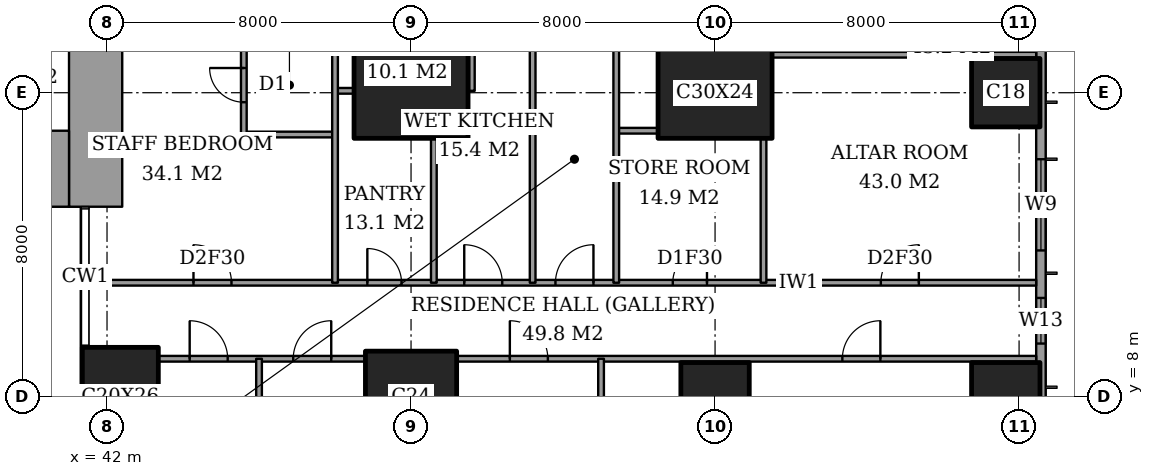
"""IFC4 building model, lengths in metres.
Left out: names, types, materials, properties, quantities, classifications, styles, units other than length and angle.
Written with IfcOpenShell. Run it as: python <this file> out.ifc"""

import sys

from ifc_helpers import new_model, si_unit, direction, frame, frame_2d, origin, origin_2d, place, context, subcontext, project, spatial, rectangle, extrude, element, fill, save


model = new_model("IFC4")
c1 = context("Model", 3, precision=1e-05, world=origin(), true_north=direction((0.0, 1.0)))
c2 = subcontext(c1, "Body", "Model", "MODEL_VIEW")
j1 = project(units=[si_unit("LENGTHUNIT", "METRE"), si_unit("PLANEANGLEUNIT", "RADIAN")], contexts=[c1])
p1 = place(None, origin())
s1 = spatial("IfcSite", under=j1, at=p1, CompositionType="ELEMENT")
p2 = place(p1, origin())
s2 = spatial("IfcBuilding", under=s1, at=p2, CompositionType="ELEMENT")
p3 = place(p2, frame((0.0, 0.0, 211.0)))
s3 = spatial("IfcBuildingStorey", under=s2, at=p3, CompositionType="ELEMENT", Elevation=211.0)
p4 = place(p3, frame((42.35, 8.0, 0.0), z_axis=(0.0, 0.0, 1.0), x_axis=(1.0, 0.0, 0.0)))
e1 = element("IfcColumn", 1, at=p4, inside=s3, PredefinedType="COLUMN", context=c2, shape_type="SweptSolid", body=[
    extrude(rectangle(XDim=2.0, YDim=2.6, at=origin_2d()), origin(), (0.0, 0.0, 1.0), 3.6),
])
p5 = place(p3, frame((50.0, 8.0, 0.0), z_axis=(0.0, 0.0, 1.0), x_axis=(1.0, 0.0, 0.0)))
e2 = element("IfcColumn", 2, at=p5, inside=s3, PredefinedType="COLUMN", context=c2, shape_type="SweptSolid", body=[
    extrude(rectangle(XDim=2.4, YDim=2.4, at=origin_2d()), origin(), (0.0, 0.0, 1.0), 3.6),
])
p6 = place(p3, frame((50.0, 16.0, 0.0), z_axis=(0.0, 0.0, 1.0), x_axis=(1.0, 0.0, 0.0)))
e3 = element("IfcColumn", 3, at=p6, inside=s3, PredefinedType="COLUMN", context=c2, shape_type="SweptSolid", body=[
    extrude(rectangle(XDim=3.0, YDim=2.4, at=origin_2d()), origin(), (0.0, 0.0, 1.0), 3.6),
])
p7 = place(p3, frame((58.0, 8.0, 0.0), z_axis=(0.0, 0.0, 1.0), x_axis=(1.0, 0.0, 0.0)))
e4 = element("IfcColumn", 4, at=p7, inside=s3, PredefinedType="COLUMN", context=c2, shape_type="SweptSolid", body=[
    extrude(rectangle(XDim=1.8, YDim=1.8, at=origin_2d()), origin(), (0.0, 0.0, 1.0), 3.6),
])
p8 = place(p3, frame((58.0, 16.0, 0.0), z_axis=(0.0, 0.0, 1.0), x_axis=(1.0, 0.0, 0.0)))
e5 = element("IfcColumn", 5, at=p8, inside=s3, PredefinedType="COLUMN", context=c2, shape_type="SweptSolid", body=[
    extrude(rectangle(XDim=3.0, YDim=2.4, at=origin_2d()), origin(), (0.0, 0.0, 1.0), 3.6),
])
for number, where, z_axis, x_axis in (
    (6, (65.65, 8.0, 0.0), (0.0, 0.0, 1.0), (1.0, 0.0, 0.0)),
    (7, (65.65, 16.0, 0.0), (0.0, 0.0, 1.0), (1.0, 0.0, 0.0)),
):
    element("IfcColumn", number, at=place(p3, frame(where, z_axis=z_axis, x_axis=x_axis)), inside=s3, PredefinedType="COLUMN", context=c2, shape_type="SweptSolid", body=[
        extrude(rectangle(XDim=1.8, YDim=1.8, at=origin_2d()), origin(), (0.0, 0.0, 1.0), 3.6),
    ])
p9 = place(p3, frame((37.85, 14.0, 0.0), z_axis=(0.0, 0.0, 1.0), x_axis=(1.0, 0.0, 0.0)))
e8 = element("IfcWall", 8, at=p9, inside=s3, PredefinedType="SHEAR", context=c2, shape_type="SweptSolid", body=[
    extrude(rectangle(XDim=3.15, YDim=2.0, at=frame_2d((1.575, 0.0))), origin(), (0.0, 0.0, 1.0), 3.6),
])
p10 = place(p3, frame((41.7, 13.0, 0.0), z_axis=(0.0, 0.0, 1.0), x_axis=(0.0, 1.0, 0.0)))
e9 = element("IfcWall", 9, at=p10, inside=s3, PredefinedType="SHEAR", context=c2, shape_type="SweptSolid", body=[
    extrude(rectangle(XDim=11.85, YDim=1.4, at=frame_2d((5.925, 0.0))), origin(), (0.0, 0.0, 1.0), 3.6),
])
p11 = place(p10, frame((7.5, 0.0, 0.0)))
e10 = element("IfcOpeningElement", 10, at=p11, cuts=e9, PredefinedType="OPENING", context=c2, shape_type="SweptSolid", body=[
    extrude(rectangle(XDim=1.8, YDim=2.4, at=frame_2d((0.9, 1.2))), frame((0.0, 0.71, 0.0), z_axis=(0.0, -1.0, 0.0), x_axis=(1.0, 0.0, 0.0)), (0.0, 0.0, 1.0), 1.42),
])
p12 = place(p3, frame((66.575, 3.175, 0.0), z_axis=(0.0, 0.0, 1.0), x_axis=(0.0, 1.0, 0.0)))
e11 = element("IfcWall", 11, at=p12, inside=s3, PredefinedType="SOLIDWALL", context=c2, shape_type="SweptSolid", body=[
    extrude(rectangle(XDim=41.65, YDim=0.25, at=frame_2d((20.825, 0.0))), origin(), (0.0, 0.0, 1.0), 3.6),
])
p13 = place(p12, frame((0.825, 0.0, 0.2)))
e12 = element("IfcOpeningElement", 12, at=p13, cuts=e11, PredefinedType="OPENING", context=c2, shape_type="SweptSolid", body=[
    extrude(rectangle(XDim=2.4, YDim=2.4, at=frame_2d((1.2, 1.2))), frame((0.0, 0.135, 0.0), z_axis=(0.0, -1.0, 0.0), x_axis=(1.0, 0.0, 0.0)), (0.0, 0.0, 1.0), 0.27),
])
p14 = place(p12, frame((6.225, 0.0, 0.2)))
e13 = element("IfcOpeningElement", 13, at=p14, cuts=e11, PredefinedType="OPENING", context=c2, shape_type="SweptSolid", body=[
    extrude(rectangle(XDim=1.2, YDim=2.4, at=frame_2d((0.6, 1.2))), frame((0.0, 0.135, 0.0), z_axis=(0.0, -1.0, 0.0), x_axis=(1.0, 0.0, 0.0)), (0.0, 0.0, 1.0), 0.27),
])
p15 = place(p12, frame((8.675, 0.0, 0.2)))
e14 = element("IfcOpeningElement", 14, at=p15, cuts=e11, PredefinedType="OPENING", context=c2, shape_type="SweptSolid", body=[
    extrude(rectangle(XDim=2.4, YDim=2.4, at=frame_2d((1.2, 1.2))), frame((0.0, 0.135, 0.0), z_axis=(0.0, -1.0, 0.0), x_axis=(1.0, 0.0, 0.0)), (0.0, 0.0, 1.0), 0.27),
])
p16 = place(p12, frame((15.675, 0.0, 0.2)))
e15 = element("IfcOpeningElement", 15, at=p16, cuts=e11, PredefinedType="OPENING", context=c2, shape_type="SweptSolid", body=[
    extrude(rectangle(XDim=2.4, YDim=2.4, at=frame_2d((1.2, 1.2))), frame((0.0, 0.135, 0.0), z_axis=(0.0, -1.0, 0.0), x_axis=(1.0, 0.0, 0.0)), (0.0, 0.0, 1.0), 0.27),
])
p17 = place(p12, frame((23.575, 0.0, 0.2)))
e16 = element("IfcOpeningElement", 16, at=p17, cuts=e11, PredefinedType="OPENING", context=c2, shape_type="SweptSolid", body=[
    extrude(rectangle(XDim=2.4, YDim=2.4, at=frame_2d((1.2, 1.2))), frame((0.0, 0.135, 0.0), z_axis=(0.0, -1.0, 0.0), x_axis=(1.0, 0.0, 0.0)), (0.0, 0.0, 1.0), 0.27),
])
p18 = place(p12, frame((30.775, 0.0, 0.2)))
e17 = element("IfcOpeningElement", 17, at=p18, cuts=e11, PredefinedType="OPENING", context=c2, shape_type="SweptSolid", body=[
    extrude(rectangle(XDim=2.4, YDim=2.4, at=frame_2d((1.2, 1.2))), frame((0.0, 0.135, 0.0), z_axis=(0.0, -1.0, 0.0), x_axis=(1.0, 0.0, 0.0)), (0.0, 0.0, 1.0), 0.27),
])
p19 = place(p12, frame((34.55, 0.0, 0.2)))
e18 = element("IfcOpeningElement", 18, at=p19, cuts=e11, PredefinedType="OPENING", context=c2, shape_type="SweptSolid", body=[
    extrude(rectangle(XDim=1.2, YDim=2.4, at=frame_2d((0.6, 1.2))), frame((0.0, 0.135, 0.0), z_axis=(0.0, -1.0, 0.0), x_axis=(1.0, 0.0, 0.0)), (0.0, 0.0, 1.0), 0.27),
])
p20 = place(p12, frame((38.425, 0.0, 0.2)))
e19 = element("IfcOpeningElement", 19, at=p20, cuts=e11, PredefinedType="OPENING", context=c2, shape_type="SweptSolid", body=[
    extrude(rectangle(XDim=2.4, YDim=2.4, at=frame_2d((1.2, 1.2))), frame((0.0, 0.135, 0.0), z_axis=(0.0, -1.0, 0.0), x_axis=(1.0, 0.0, 0.0)), (0.0, 0.0, 1.0), 0.27),
])
p21 = place(p3, frame((43.35, 9.0, 0.0), z_axis=(0.0, 0.0, 1.0), x_axis=(1.0, 0.0, 0.0)))
e20 = element("IfcWall", 20, at=p21, inside=s3, PredefinedType="PARTITIONING", context=c2, shape_type="SweptSolid", body=[
    extrude(rectangle(XDim=5.45, YDim=0.15, at=frame_2d((2.725, 0.0))), origin(), (0.0, 0.0, 1.0), 3.35),
])
p22 = place(p21, frame((3.55, 0.0, 0.0)))
e21 = element("IfcOpeningElement", 21, at=p22, cuts=e20, PredefinedType="OPENING", context=c2, shape_type="SweptSolid", body=[
    extrude(rectangle(XDim=1.0, YDim=2.1, at=frame_2d((0.5, 1.05))), frame((0.0, 0.085, 0.0), z_axis=(0.0, -1.0, 0.0), x_axis=(1.0, 0.0, 0.0)), (0.0, 0.0, 1.0), 0.17),
])
p23 = place(p21, frame((0.825, 0.0, 0.0)))
e22 = element("IfcOpeningElement", 22, at=p23, cuts=e20, PredefinedType="OPENING", context=c2, shape_type="SweptSolid", body=[
    extrude(rectangle(XDim=1.0, YDim=2.1, at=frame_2d((0.5, 1.05))), frame((0.0, 0.085, 0.0), z_axis=(0.0, -1.0, 0.0), x_axis=(1.0, 0.0, 0.0)), (0.0, 0.0, 1.0), 0.17),
])
p24 = place(p3, frame((51.2, 9.0, 0.0), z_axis=(0.0, 0.0, 1.0), x_axis=(1.0, 0.0, 0.0)))
e23 = element("IfcWall", 23, at=p24, inside=s3, PredefinedType="PARTITIONING", context=c2, shape_type="SweptSolid", body=[
    extrude(rectangle(XDim=15.25, YDim=0.15, at=frame_2d((7.625, 0.0))), origin(), (0.0, 0.0, 1.0), 3.35),
])
p25 = place(p24, frame((10.15, 0.0, 0.0)))
e24 = element("IfcOpeningElement", 24, at=p25, cuts=e23, PredefinedType="OPENING", context=c2, shape_type="SweptSolid", body=[
    extrude(rectangle(XDim=1.0, YDim=2.1, at=frame_2d((0.5, 1.05))), frame((0.0, 0.085, 0.0), z_axis=(0.0, -1.0, 0.0), x_axis=(1.0, 0.0, 0.0)), (0.0, 0.0, 1.0), 0.17),
])
p26 = place(p24, frame((1.4, 0.0, 0.0)))
e25 = element("IfcOpeningElement", 25, at=p26, cuts=e23, PredefinedType="OPENING", context=c2, shape_type="SweptSolid", body=[
    extrude(rectangle(XDim=1.0, YDim=2.1, at=frame_2d((0.5, 1.05))), frame((0.0, 0.085, 0.0), z_axis=(0.0, -1.0, 0.0), x_axis=(1.0, 0.0, 0.0)), (0.0, 0.0, 1.0), 0.17),
])
p27 = place(p3, frame((41.439, 11.0, 0.0), z_axis=(0.0, 0.0, 1.0), x_axis=(1.0, 0.0, 0.0)))
e26 = element("IfcWall", 26, at=p27, inside=s3, PredefinedType="PARTITIONING", context=c2, shape_type="SweptSolid", body=[
    extrude(rectangle(XDim=25.011, YDim=0.15, at=frame_2d((12.505, 0.0))), origin(), (0.0, 0.0, 1.0), 3.35),
])
p28 = place(p27, frame((12.361, 0.0, 0.0)))
e27 = element("IfcOpeningElement", 27, at=p28, cuts=e26, PredefinedType="OPENING", context=c2, shape_type="SweptSolid", body=[
    extrude(rectangle(XDim=1.0, YDim=2.1, at=frame_2d((0.5, 1.05))), frame((0.0, 0.085, 0.0), z_axis=(0.0, -1.0, 0.0), x_axis=(1.0, 0.0, 0.0)), (0.0, 0.0, 1.0), 0.17),
])
p29 = place(p27, frame((20.924, 0.0, 0.0)))
e28 = element("IfcOpeningElement", 28, at=p29, cuts=e26, PredefinedType="OPENING", context=c2, shape_type="SweptSolid", body=[
    extrude(rectangle(XDim=1.0, YDim=2.1, at=frame_2d((0.5, 1.05))), frame((0.0, 0.085, 0.0), z_axis=(0.0, -1.0, 0.0), x_axis=(1.0, 0.0, 0.0)), (0.0, 0.0, 1.0), 0.17),
])
p30 = place(p27, frame((15.448, 0.0, 0.0)))
e29 = element("IfcOpeningElement", 29, at=p30, cuts=e26, PredefinedType="OPENING", context=c2, shape_type="SweptSolid", body=[
    extrude(rectangle(XDim=0.9, YDim=2.1, at=frame_2d((0.45, 1.05))), frame((0.0, 0.085, 0.0), z_axis=(0.0, -1.0, 0.0), x_axis=(1.0, 0.0, 0.0)), (0.0, 0.0, 1.0), 0.17),
])
p31 = place(p27, frame((9.961, 0.0, 0.0)))
e30 = element("IfcOpeningElement", 30, at=p31, cuts=e26, PredefinedType="OPENING", context=c2, shape_type="SweptSolid", body=[
    extrude(rectangle(XDim=1.0, YDim=2.1, at=frame_2d((0.5, 1.05))), frame((0.0, 0.085, 0.0), z_axis=(0.0, -1.0, 0.0), x_axis=(1.0, 0.0, 0.0)), (0.0, 0.0, 1.0), 0.17),
])
p32 = place(p27, frame((7.411, 0.0, 0.0)))
e31 = element("IfcOpeningElement", 31, at=p32, cuts=e26, PredefinedType="OPENING", context=c2, shape_type="SweptSolid", body=[
    extrude(rectangle(XDim=0.9, YDim=2.1, at=frame_2d((0.45, 1.05))), frame((0.0, 0.085, 0.0), z_axis=(0.0, -1.0, 0.0), x_axis=(1.0, 0.0, 0.0)), (0.0, 0.0, 1.0), 0.17),
])
p33 = place(p27, frame((2.836, 0.0, 0.0)))
e32 = element("IfcOpeningElement", 32, at=p33, cuts=e26, PredefinedType="OPENING", context=c2, shape_type="SweptSolid", body=[
    extrude(rectangle(XDim=1.0, YDim=2.1, at=frame_2d((0.5, 1.05))), frame((0.0, 0.085, 0.0), z_axis=(0.0, -1.0, 0.0), x_axis=(1.0, 0.0, 0.0)), (0.0, 0.0, 1.0), 0.17),
])
p34 = place(p3, frame((45.6, 14.9, 0.0), z_axis=(0.0, 0.0, 1.0), x_axis=(1.0, 0.0, 0.0)))
e33 = element("IfcWall", 33, at=p34, inside=s3, PredefinedType="PARTITIONING", context=c2, shape_type="SweptSolid", body=[
    extrude(rectangle(XDim=2.4, YDim=0.15, at=frame_2d((1.2, 0.0))), origin(), (0.0, 0.0, 1.0), 3.35),
])
p35 = place(p3, frame((55.4, 15.0, 0.0), z_axis=(0.0, 0.0, 1.0), x_axis=(1.0, 0.0, 0.0)))
e34 = element("IfcWall", 34, at=p35, inside=s3, PredefinedType="PARTITIONING", context=c2, shape_type="SweptSolid", body=[
    extrude(rectangle(XDim=1.1, YDim=0.15, at=frame_2d((0.55, 0.0))), origin(), (0.0, 0.0, 1.0), 3.35),
])
p36 = place(p3, frame((48.0, 16.05, 0.0), z_axis=(0.0, 0.0, 1.0), x_axis=(1.0, 0.0, 0.0)))
e35 = element("IfcWall", 35, at=p36, inside=s3, PredefinedType="PARTITIONING", context=c2, shape_type="SweptSolid", body=[
    extrude(rectangle(XDim=0.5, YDim=0.15, at=frame_2d((0.25, 0.0))), origin(), (0.0, 0.0, 1.0), 2.634),
])
p37 = place(p3, frame((59.5, 17.0, 0.0), z_axis=(0.0, 0.0, 1.0), x_axis=(1.0, 0.0, 0.0)))
e36 = element("IfcWall", 36, at=p37, inside=s3, PredefinedType="PARTITIONING", context=c2, shape_type="SweptSolid", body=[
    extrude(rectangle(XDim=6.95, YDim=0.15, at=frame_2d((3.475, 0.0))), origin(), (0.0, 0.0, 1.0), 3.35),
])
p38 = place(p3, frame((45.6, 14.9, 0.0), z_axis=(0.0, 0.0, 1.0), x_axis=(0.0, 1.0, 0.0)))
e37 = element("IfcWall", 37, at=p38, inside=s3, PredefinedType="PARTITIONING", context=c2, shape_type="SweptSolid", body=[
    extrude(rectangle(XDim=2.6, YDim=0.15, at=frame_2d((1.3, 0.0))), origin(), (0.0, 0.0, 1.0), 3.35),
])
p39 = place(p38, frame((0.85, 0.0, 0.0)))
e38 = element("IfcOpeningElement", 38, at=p39, cuts=e37, PredefinedType="OPENING", context=c2, shape_type="SweptSolid", body=[
    extrude(rectangle(XDim=0.9, YDim=2.1, at=frame_2d((0.45, 1.05))), frame((0.0, 0.085, 0.0), z_axis=(0.0, -1.0, 0.0), x_axis=(1.0, 0.0, 0.0)), (0.0, 0.0, 1.0), 0.17),
])
p40 = place(p3, frame((46.0, -0.45, 0.0), z_axis=(0.0, 0.0, 1.0), x_axis=(0.0, 1.0, 0.0)))
e39 = element("IfcWall", 39, at=p40, inside=s3, PredefinedType="PARTITIONING", context=c2, shape_type="SweptSolid", body=[
    extrude(rectangle(XDim=9.45, YDim=0.15, at=frame_2d((4.725, 0.0))), origin(), (0.0, 0.0, 1.0), 3.35),
])
p41 = place(p3, frame((48.0, 11.0, 0.0), z_axis=(0.0, 0.0, 1.0), x_axis=(0.0, 1.0, 0.0)))
e40 = element("IfcWall", 40, at=p41, inside=s3, PredefinedType="PARTITIONING", context=c2, shape_type="SweptSolid", body=[
    extrude(rectangle(XDim=6.5, YDim=0.15, at=frame_2d((3.25, 0.0))), origin(), (0.0, 0.0, 1.0), 3.35),
])
p42 = place(p3, frame((50.6, 11.0, 0.0), z_axis=(0.0, 0.0, 1.0), x_axis=(0.0, 1.0, 0.0)))
e41 = element("IfcWall", 41, at=p42, inside=s3, PredefinedType="PARTITIONING", context=c2, shape_type="SweptSolid", body=[
    extrude(rectangle(XDim=3.8, YDim=0.15, at=frame_2d((1.9, 0.0))), origin(), (0.0, 0.0, 1.0), 3.35),
])
p43 = place(p3, frame((51.6, 16.05, 0.0), z_axis=(0.0, 0.0, 1.0), x_axis=(0.0, 1.0, 0.0)))
e42 = element("IfcWall", 42, at=p43, inside=s3, PredefinedType="PARTITIONING", context=c2, shape_type="SweptSolid", body=[
    extrude(rectangle(XDim=1.45, YDim=0.15, at=frame_2d((0.725, 0.0))), origin(), (0.0, 0.0, 1.0), 3.35),
])
p44 = place(p3, frame((53.2, 11.0, 0.0), z_axis=(0.0, 0.0, 1.0), x_axis=(0.0, 1.0, 0.0)))
e43 = element("IfcWall", 43, at=p44, inside=s3, PredefinedType="PARTITIONING", context=c2, shape_type="SweptSolid", body=[
    extrude(rectangle(XDim=6.5, YDim=0.15, at=frame_2d((3.25, 0.0))), origin(), (0.0, 0.0, 1.0), 3.35),
])
p45 = place(p3, frame((55.0, -0.45, 0.0), z_axis=(0.0, 0.0, 1.0), x_axis=(0.0, 1.0, 0.0)))
e44 = element("IfcWall", 44, at=p45, inside=s3, PredefinedType="PARTITIONING", context=c2, shape_type="SweptSolid", body=[
    extrude(rectangle(XDim=9.45, YDim=0.15, at=frame_2d((4.725, 0.0))), origin(), (0.0, 0.0, 1.0), 3.35),
])
p46 = place(p3, frame((55.4, 11.0, 0.0), z_axis=(0.0, 0.0, 1.0), x_axis=(0.0, 1.0, 0.0)))
e45 = element("IfcWall", 45, at=p46, inside=s3, PredefinedType="PARTITIONING", context=c2, shape_type="SweptSolid", body=[
    extrude(rectangle(XDim=10.6, YDim=0.15, at=frame_2d((5.3, 0.0))), origin(), (0.0, 0.0, 1.0), 3.35),
])
p47 = place(p46, frame((8.05, 0.0, 0.0)))
e46 = element("IfcOpeningElement", 46, at=p47, cuts=e45, PredefinedType="OPENING", context=c2, shape_type="SweptSolid", body=[
    extrude(rectangle(XDim=1.0, YDim=2.1, at=frame_2d((0.5, 1.05))), frame((0.0, 0.085, 0.0), z_axis=(0.0, -1.0, 0.0), x_axis=(1.0, 0.0, 0.0)), (0.0, 0.0, 1.0), 0.17),
])
p48 = place(p3, frame((59.275, 11.0, 0.0), z_axis=(0.0, 0.0, 1.0), x_axis=(0.0, 1.0, 0.0)))
e47 = element("IfcWall", 47, at=p48, inside=s3, PredefinedType="PARTITIONING", context=c2, shape_type="SweptSolid", body=[
    extrude(rectangle(XDim=3.8, YDim=0.15, at=frame_2d((1.9, 0.0))), origin(), (0.0, 0.0, 1.0), 3.35),
])
p49 = place(p14, origin())
e48 = element("IfcWindow", 48, at=p49, inside=s3, PartitioningType="SINGLE_PANEL", PredefinedType="WINDOW", context=c2, shape_type="SweptSolid", body=[
    extrude(rectangle(XDim=1.2, YDim=2.4, at=frame_2d((0.6, 1.2))), frame((0.0, 0.03, 0.0), z_axis=(0.0, -1.0, 0.0), x_axis=(1.0, 0.0, 0.0)), (0.0, 0.0, 1.0), 0.06),
])
fill(e13, e48)
p50 = place(p15, origin())
e49 = element("IfcWindow", 49, at=p50, inside=s3, PartitioningType="SINGLE_PANEL", PredefinedType="WINDOW", context=c2, shape_type="SweptSolid", body=[
    extrude(rectangle(XDim=2.4, YDim=2.4, at=frame_2d((1.2, 1.2))), frame((0.0, 0.03, 0.0), z_axis=(0.0, -1.0, 0.0), x_axis=(1.0, 0.0, 0.0)), (0.0, 0.0, 1.0), 0.06),
])
fill(e14, e49)
p51 = place(p25, origin())
e50 = element("IfcDoor", 50, at=p51, inside=s3, OperationType="SINGLE_SWING_LEFT", PredefinedType="DOOR", context=c2, shape_type="SweptSolid", body=[
    extrude(rectangle(XDim=1.0, YDim=2.1, at=frame_2d((0.5, 1.05))), frame((0.0, 0.025, 0.0), z_axis=(0.0, -1.0, 0.0), x_axis=(1.0, 0.0, 0.0)), (0.0, 0.0, 1.0), 0.05),
])
fill(e24, e50)
p52 = place(p26, origin())
e51 = element("IfcDoor", 51, at=p52, inside=s3, OperationType="SINGLE_SWING_RIGHT", PredefinedType="DOOR", context=c2, shape_type="SweptSolid", body=[
    extrude(rectangle(XDim=1.0, YDim=2.1, at=frame_2d((0.5, 1.05))), frame((0.0, 0.025, 0.0), z_axis=(0.0, -1.0, 0.0), x_axis=(1.0, 0.0, 0.0)), (0.0, 0.0, 1.0), 0.05),
])
fill(e25, e51)
p53 = place(p22, origin())
e52 = element("IfcDoor", 52, at=p53, inside=s3, OperationType="SINGLE_SWING_LEFT", PredefinedType="DOOR", context=c2, shape_type="SweptSolid", body=[
    extrude(rectangle(XDim=1.0, YDim=2.1, at=frame_2d((0.5, 1.05))), frame((0.0, 0.025, 0.0), z_axis=(0.0, -1.0, 0.0), x_axis=(1.0, 0.0, 0.0)), (0.0, 0.0, 1.0), 0.05),
])
fill(e21, e52)
p54 = place(p23, origin())
e53 = element("IfcDoor", 53, at=p54, inside=s3, OperationType="SINGLE_SWING_RIGHT", PredefinedType="DOOR", context=c2, shape_type="SweptSolid", body=[
    extrude(rectangle(XDim=1.0, YDim=2.1, at=frame_2d((0.5, 1.05))), frame((0.0, 0.025, 0.0), z_axis=(0.0, -1.0, 0.0), x_axis=(1.0, 0.0, 0.0)), (0.0, 0.0, 1.0), 0.05),
])
fill(e22, e53)
p55 = place(p28, origin())
e54 = element("IfcDoor", 54, at=p55, inside=s3, OperationType="SINGLE_SWING_LEFT", PredefinedType="DOOR", context=c2, shape_type="SweptSolid", body=[
    extrude(rectangle(XDim=1.0, YDim=2.1, at=frame_2d((0.5, 1.05))), frame((0.0, 0.025, 0.0), z_axis=(0.0, -1.0, 0.0), x_axis=(1.0, 0.0, 0.0)), (0.0, 0.0, 1.0), 0.05),
])
fill(e27, e54)
p56 = place(p29, origin())
e55 = element("IfcDoor", 55, at=p56, inside=s3, OperationType="SINGLE_SWING_LEFT", PredefinedType="DOOR", context=c2, shape_type="SweptSolid", body=[
    extrude(rectangle(XDim=1.0, YDim=2.1, at=frame_2d((0.5, 1.05))), frame((0.0, 0.025, 0.0), z_axis=(0.0, -1.0, 0.0), x_axis=(1.0, 0.0, 0.0)), (0.0, 0.0, 1.0), 0.05),
])
fill(e28, e55)
p57 = place(p30, origin())
e56 = element("IfcDoor", 56, at=p57, inside=s3, OperationType="SINGLE_SWING_LEFT", PredefinedType="DOOR", context=c2, shape_type="SweptSolid", body=[
    extrude(rectangle(XDim=0.9, YDim=2.1, at=frame_2d((0.45, 1.05))), frame((0.0, 0.025, 0.0), z_axis=(0.0, -1.0, 0.0), x_axis=(1.0, 0.0, 0.0)), (0.0, 0.0, 1.0), 0.05),
])
fill(e29, e56)
p58 = place(p31, origin())
e57 = element("IfcDoor", 57, at=p58, inside=s3, OperationType="SINGLE_SWING_RIGHT", PredefinedType="DOOR", context=c2, shape_type="SweptSolid", body=[
    extrude(rectangle(XDim=1.0, YDim=2.1, at=frame_2d((0.5, 1.05))), frame((0.0, 0.025, 0.0), z_axis=(0.0, -1.0, 0.0), x_axis=(1.0, 0.0, 0.0)), (0.0, 0.0, 1.0), 0.05),
])
fill(e30, e57)
p59 = place(p32, origin())
e58 = element("IfcDoor", 58, at=p59, inside=s3, OperationType="SINGLE_SWING_RIGHT", PredefinedType="DOOR", context=c2, shape_type="SweptSolid", body=[
    extrude(rectangle(XDim=0.9, YDim=2.1, at=frame_2d((0.45, 1.05))), frame((0.0, 0.025, 0.0), z_axis=(0.0, -1.0, 0.0), x_axis=(1.0, 0.0, 0.0)), (0.0, 0.0, 1.0), 0.05),
])
fill(e31, e58)
p60 = place(p39, origin())
e59 = element("IfcDoor", 59, at=p60, inside=s3, OperationType="SINGLE_SWING_LEFT", PredefinedType="DOOR", context=c2, shape_type="SweptSolid", body=[
    extrude(rectangle(XDim=0.9, YDim=2.1, at=frame_2d((0.45, 1.05))), frame((0.0, 0.025, 0.0), z_axis=(0.0, -1.0, 0.0), x_axis=(1.0, 0.0, 0.0)), (0.0, 0.0, 1.0), 0.05),
])
fill(e38, e59)
p61 = place(p33, origin())
e60 = element("IfcDoor", 60, at=p61, inside=s3, OperationType="SINGLE_SWING_RIGHT", PredefinedType="DOOR", context=c2, shape_type="SweptSolid", body=[
    extrude(rectangle(XDim=1.0, YDim=2.1, at=frame_2d((0.5, 1.05))), frame((0.0, 0.025, 0.0), z_axis=(0.0, -1.0, 0.0), x_axis=(1.0, 0.0, 0.0)), (0.0, 0.0, 1.0), 0.05),
])
fill(e32, e60)
save(model, sys.argv[1])
